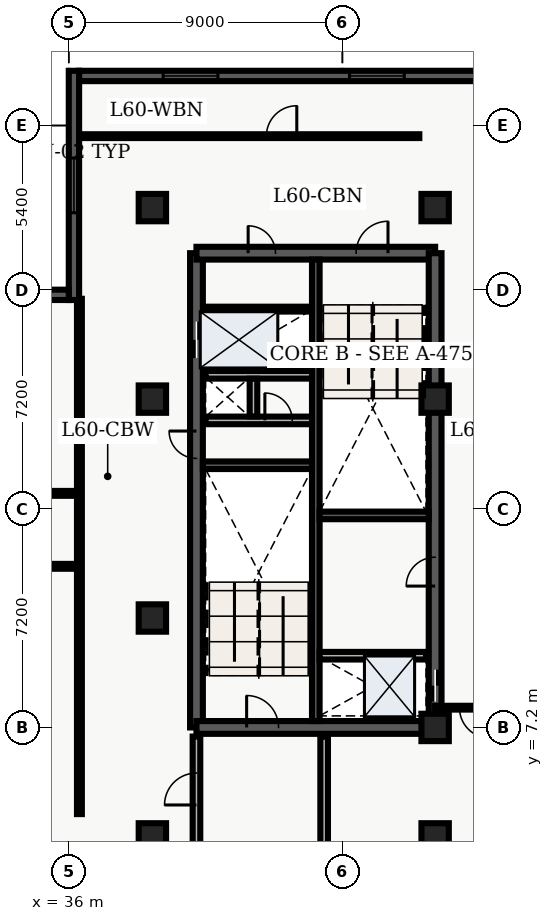
"""IFC4 building model, lengths in metres.
Left out: names, types, materials, properties, quantities, classifications, styles, units other than length and angle.
Written with IfcOpenShell. Run it as: python <this file> out.ifc"""

import sys

from ifc_helpers import new_model, entity, si_unit, converted_unit, direction, frame, origin_with_axes, origin_2d_with_axis, place, context, subcontext, project, spatial, polyline, rectangle, outline, extrude, element, fill, save


model = new_model("IFC4")
c1 = context("Model", 3, precision=1e-05, world=origin_with_axes(), true_north=direction((0.0, 1.0)))
c2 = subcontext(c1, "Body", "Model", "MODEL_VIEW")
j1 = project(units=[si_unit("LENGTHUNIT", "METRE"), converted_unit("PLANEANGLEUNIT", "DEGREE", entity("IfcPlaneAngleMeasure", 0.017), si_unit("PLANEANGLEUNIT", "RADIAN"), dimensions=[0, 0, 0, 0, 0, 0, 0])], contexts=[c1])
p1 = place(None, origin_with_axes())
s1 = spatial("IfcSite", under=j1, at=p1, CompositionType="ELEMENT")
p2 = place(p1, origin_with_axes())
s2 = spatial("IfcBuilding", under=s1, at=p2, CompositionType="ELEMENT")
p3 = place(p2, frame((0.0, 0.0, 244.2), z_axis=(0.0, 0.0, 1.0), x_axis=(1.0, 0.0, 0.0)))
s3 = spatial("IfcBuildingStorey", under=s2, at=p3, CompositionType="ELEMENT", Elevation=244.2)
p4 = place(p3, frame((40.2, 7.2, 0.0), z_axis=(0.0, 0.0, 1.0), x_axis=(0.0, 1.0, 0.0)))
e1 = element("IfcWall", 1, at=p4, inside=s3, PredefinedType="SHEAR", context=c2, shape_type="SweptSolid", body=[
    extrude(outline(polyline([(0.0, -0.21), (15.6, -0.21), (15.6, 0.21), (0.0, 0.21), (0.0, -0.21)])), origin_with_axes(), (0.0, 0.0, 1.0), 3.6),
])
p5 = place(p4, frame((12.75, 0.0, 0.0), z_axis=(0.0, 0.0, 1.0), x_axis=(1.0, 0.0, 0.0)))
e2 = element("IfcOpeningElement", 2, at=p5, cuts=e1, PredefinedType="OPENING", context=c2, shape_type="SweptSolid", body=[
    extrude(rectangle(XDim=1.2, YDim=0.44, at=origin_2d_with_axis()), origin_with_axes(), (0.0, 0.0, 1.0), 2.15),
])
p6 = place(p4, frame((9.3, 0.0, 0.0), z_axis=(0.0, 0.0, 1.0), x_axis=(1.0, 0.0, 0.0)))
e3 = element("IfcOpeningElement", 3, at=p6, cuts=e1, PredefinedType="OPENING", context=c2, shape_type="SweptSolid", body=[
    extrude(rectangle(XDim=0.9, YDim=0.44, at=origin_2d_with_axis()), origin_with_axes(), (0.0, 0.0, 1.0), 2.15),
])
p7 = place(p3, frame((40.2, 7.2, 0.0), z_axis=(0.0, 0.0, 1.0), x_axis=(1.0, 0.0, 0.0)))
e4 = element("IfcWall", 4, at=p7, inside=s3, PredefinedType="SHEAR", context=c2, shape_type="SweptSolid", body=[
    extrude(outline(polyline([(0.0, -0.21), (7.85, -0.21), (7.85, 0.21), (0.0, 0.21), (0.0, -0.21)])), origin_with_axes(), (0.0, 0.0, 1.0), 3.6),
])
p8 = place(p7, frame((2.175, 0.0, 0.0), z_axis=(0.0, 0.0, 1.0), x_axis=(1.0, 0.0, 0.0)))
e5 = element("IfcOpeningElement", 5, at=p8, cuts=e4, PredefinedType="OPENING", context=c2, shape_type="SweptSolid", body=[
    extrude(rectangle(XDim=1.05, YDim=0.44, at=origin_2d_with_axis()), origin_with_axes(), (0.0, 0.0, 1.0), 2.15),
])
p9 = place(p3, frame((40.2, 22.8, 0.0), z_axis=(0.0, 0.0, 1.0), x_axis=(1.0, 0.0, 0.0)))
e6 = element("IfcWall", 6, at=p9, inside=s3, PredefinedType="SHEAR", context=c2, shape_type="SweptSolid", body=[
    extrude(outline(polyline([(0.0, -0.21), (7.85, -0.21), (7.85, 0.21), (0.0, 0.21), (0.0, -0.21)])), origin_with_axes(), (0.0, 0.0, 1.0), 3.6),
])
p10 = place(p9, frame((5.775, 0.0, 0.0), z_axis=(0.0, 0.0, 1.0), x_axis=(1.0, 0.0, 0.0)))
e7 = element("IfcOpeningElement", 7, at=p10, cuts=e6, PredefinedType="OPENING", context=c2, shape_type="SweptSolid", body=[
    extrude(rectangle(XDim=1.05, YDim=0.44, at=origin_2d_with_axis()), origin_with_axes(), (0.0, 0.0, 1.0), 2.15),
])
p11 = place(p9, frame((2.15, 0.0, 0.0), z_axis=(0.0, 0.0, 1.0), x_axis=(1.0, 0.0, 0.0)))
e8 = element("IfcOpeningElement", 8, at=p11, cuts=e6, PredefinedType="OPENING", context=c2, shape_type="SweptSolid", body=[
    extrude(rectangle(XDim=0.9, YDim=0.44, at=origin_2d_with_axis()), origin_with_axes(), (0.0, 0.0, 1.0), 2.15),
])
p12 = place(p3, frame((48.05, 7.2, 0.0), z_axis=(0.0, 0.0, 1.0), x_axis=(0.0, 1.0, 0.0)))
e9 = element("IfcWall", 9, at=p12, inside=s3, PredefinedType="SHEAR", context=c2, shape_type="SweptSolid", body=[
    extrude(outline(polyline([(0.0, -0.21), (15.6, -0.21), (15.6, 0.21), (0.0, 0.21), (0.0, -0.21)])), origin_with_axes(), (0.0, 0.0, 1.0), 3.6),
])
p13 = place(p12, frame((1.375, 0.0, 0.0), z_axis=(0.0, 0.0, 1.0), x_axis=(1.0, 0.0, 0.0)))
e10 = element("IfcOpeningElement", 10, at=p13, cuts=e9, PredefinedType="OPENING", context=c2, shape_type="SweptSolid", body=[
    extrude(rectangle(XDim=1.05, YDim=0.44, at=origin_2d_with_axis()), origin_with_axes(), (0.0, 0.0, 1.0), 2.15),
])
p14 = place(p12, frame((5.125, 0.0, 0.0), z_axis=(0.0, 0.0, 1.0), x_axis=(1.0, 0.0, 0.0)))
e11 = element("IfcOpeningElement", 11, at=p14, cuts=e9, PredefinedType="OPENING", context=c2, shape_type="SweptSolid", body=[
    extrude(rectangle(XDim=0.95, YDim=0.44, at=origin_2d_with_axis()), origin_with_axes(), (0.0, 0.0, 1.0), 2.15),
])
p15 = place(p3, frame((44.125, 7.41, 0.0), z_axis=(0.0, 0.0, 1.0), x_axis=(0.0, 1.0, 0.0)))
e12 = element("IfcWall", 12, at=p15, inside=s3, PredefinedType="SHEAR", context=c2, shape_type="SweptSolid", body=[
    extrude(outline(polyline([(0.0, -0.125), (15.18, -0.125), (15.18, 0.125), (0.0, 0.125), (0.0, -0.125)])), origin_with_axes(), (0.0, 0.0, 1.0), 3.6),
])
for number, where, z_axis, x_axis in (
    (13, (40.41, 15.825, 0.0), (0.0, 0.0, 1.0), (1.0, 0.0, 0.0)),
    (14, (44.25, 14.175, 0.0), (0.0, 0.0, 1.0), (1.0, 0.0, 0.0)),
):
    element("IfcWall", number, at=place(p3, frame(where, z_axis=z_axis, x_axis=x_axis)), inside=s3, PredefinedType="SHEAR", context=c2, shape_type="SweptSolid", body=[
        extrude(outline(polyline([(0.0, -0.125), (3.59, -0.125), (3.59, 0.125), (0.0, 0.125), (0.0, -0.125)])), origin_with_axes(), (0.0, 0.0, 1.0), 3.6),
    ])
p16 = place(p3, frame((40.5, 17.3, 0.0), z_axis=(0.0, 0.0, 1.0), x_axis=(1.0, 0.0, 0.0)))
e15 = element("IfcWall", 15, at=p16, inside=s3, PredefinedType="SOLIDWALL", context=c2, shape_type="SweptSolid", body=[
    extrude(outline(polyline([(0.0, -0.125), (3.5, -0.125), (3.5, 0.125), (0.0, 0.125), (0.0, -0.125)])), origin_with_axes(), (0.0, 0.0, 1.0), 2.64),
])
p17 = place(p16, frame((2.4, 0.0, 0.0), z_axis=(0.0, 0.0, 1.0), x_axis=(1.0, 0.0, 0.0)))
e16 = element("IfcOpeningElement", 16, at=p17, cuts=e15, PredefinedType="OPENING", context=c2, shape_type="SweptSolid", body=[
    extrude(rectangle(XDim=0.9, YDim=0.27, at=origin_2d_with_axis()), origin_with_axes(), (0.0, 0.0, 1.0), 2.15),
])
p18 = place(p3, frame((40.5, 18.8, 0.0), z_axis=(0.0, 0.0, 1.0), x_axis=(1.0, 0.0, 0.0)))
e17 = element("IfcWall", 17, at=p18, inside=s3, PredefinedType="SOLIDWALL", context=c2, shape_type="SweptSolid", body=[
    extrude(outline(polyline([(0.0, -0.125), (3.5, -0.125), (3.5, 0.125), (0.0, 0.125), (0.0, -0.125)])), origin_with_axes(), (0.0, 0.0, 1.0), 2.64),
])
p19 = place(p3, frame((42.075, 17.43, 0.0), z_axis=(0.0, 0.0, 1.0), x_axis=(0.0, 1.0, 0.0)))
e18 = element("IfcWall", 18, at=p19, inside=s3, PredefinedType="SOLIDWALL", context=c2, shape_type="SweptSolid", body=[
    extrude(outline(polyline([(0.0, -0.125), (1.24, -0.125), (1.24, 0.125), (0.0, 0.125), (0.0, -0.125)])), origin_with_axes(), (0.0, 0.0, 1.0), 2.64),
])
p20 = place(p3, frame((40.2, 3.1, 0.0), z_axis=(0.0, 0.0, 1.0), x_axis=(0.0, 1.0, 0.0)))
e19 = element("IfcWall", 19, at=p20, inside=s3, PredefinedType="SOLIDWALL", context=c2, shape_type="SweptSolid", body=[
    extrude(outline(polyline([(0.0, -0.125), (3.8, -0.125), (3.8, 0.125), (0.0, 0.125), (0.0, -0.125)])), origin_with_axes(), (0.0, 0.0, 1.0), 2.64),
])
p21 = place(p20, frame((2.075, 0.0, 0.0), z_axis=(0.0, 0.0, 1.0), x_axis=(1.0, 0.0, 0.0)))
e20 = element("IfcOpeningElement", 20, at=p21, cuts=e19, PredefinedType="OPENING", context=c2, shape_type="SweptSolid", body=[
    extrude(rectangle(XDim=1.05, YDim=0.27, at=origin_2d_with_axis()), origin_with_axes(), (0.0, 0.0, 1.0), 2.15),
])
p22 = place(p3, frame((44.4, 3.1, 0.0), z_axis=(0.0, 0.0, 1.0), x_axis=(0.0, 1.0, 0.0)))
e21 = element("IfcWall", 21, at=p22, inside=s3, PredefinedType="SOLIDWALL", context=c2, shape_type="SweptSolid", body=[
    extrude(outline(polyline([(0.0, -0.125), (3.8, -0.125), (3.8, 0.125), (0.0, 0.125), (0.0, -0.125)])), origin_with_axes(), (0.0, 0.0, 1.0), 2.64),
])
for number, where, z_axis, x_axis in (
    (22, (38.75, 3.6, 0.0), (0.0, 0.0, 1.0), (1.0, 0.0, 0.0)),
    (23, (38.75, 10.8, 0.0), (0.0, 0.0, 1.0), (1.0, 0.0, 0.0)),
    (24, (38.75, 18.0, 0.0), (0.0, 0.0, 1.0), (1.0, 0.0, 0.0)),
    (25, (38.75, 24.3, 0.0), (0.0, 0.0, 1.0), (1.0, 0.0, 0.0)),
    (26, (48.05, 3.6, 0.0), (0.0, 0.0, 1.0), (1.0, 0.0, 0.0)),
    (27, (48.05, 7.2, 0.0), (0.0, 0.0, 1.0), (1.0, 0.0, 0.0)),
    (28, (48.05, 18.0, 0.0), (0.0, 0.0, 1.0), (1.0, 0.0, 0.0)),
    (29, (48.05, 24.3, 0.0), (0.0, 0.0, 1.0), (1.0, 0.0, 0.0)),
):
    element("IfcColumn", number, at=place(p3, frame(where, z_axis=z_axis, x_axis=x_axis)), inside=s3, PredefinedType="COLUMN", context=c2, shape_type="SweptSolid", body=[
        extrude(rectangle(XDim=0.9, YDim=0.9, at=origin_2d_with_axis()), origin_with_axes(), (0.0, 0.0, 1.0), 3.9),
    ])
p23 = place(p3, frame((40.5, 20.96, 0.0), z_axis=(0.0, 0.0, 1.0), x_axis=(1.0, 0.0, 0.0)))
e30 = element("IfcWall", 30, at=p23, inside=s3, PredefinedType="PARTITIONING", context=c2, shape_type="SweptSolid", body=[
    extrude(outline(polyline([(0.0, -0.08), (3.5, -0.08), (3.5, 0.08), (0.0, 0.08), (0.0, -0.08)])), origin_with_axes(), (0.0, 0.0, 1.0), 2.64),
])
p24 = place(p3, frame((44.25, 9.56, 0.0), z_axis=(0.0, 0.0, 1.0), x_axis=(1.0, 0.0, 0.0)))
e31 = element("IfcWall", 31, at=p24, inside=s3, PredefinedType="SOLIDWALL", context=c2, shape_type="SweptSolid", body=[
    extrude(outline(polyline([(0.0, -0.125), (3.5, -0.125), (3.5, 0.125), (0.0, 0.125), (0.0, -0.125)])), origin_with_axes(), (0.0, 0.0, 1.0), 2.64),
])
p25 = place(p3, frame((20.3, 12.5, 0.0), z_axis=(0.0, 0.0, 1.0), x_axis=(1.0, 0.0, 0.0)))
e32 = element("IfcWall", 32, at=p25, inside=s3, PredefinedType="PARTITIONING", context=c2, shape_type="SweptSolid", body=[
    extrude(outline(polyline([(0.0, -0.08), (16.05, -0.08), (16.05, 0.08), (0.0, 0.08), (0.0, -0.08)])), origin_with_axes(), (0.0, 0.0, 1.0), 2.64),
])
p26 = place(p25, frame((8.075, 0.0, 0.0), z_axis=(0.0, 0.0, 1.0), x_axis=(1.0, 0.0, 0.0)))
e33 = element("IfcOpeningElement", 33, at=p26, cuts=e32, PredefinedType="OPENING", context=c2, shape_type="SweptSolid", body=[
    extrude(rectangle(XDim=1.0, YDim=0.18, at=origin_2d_with_axis()), origin_with_axes(), (0.0, 0.0, 1.0), 2.15),
])
p27 = place(p3, frame((20.3, 14.9, 0.0), z_axis=(0.0, 0.0, 1.0), x_axis=(1.0, 0.0, 0.0)))
e34 = element("IfcWall", 34, at=p27, inside=s3, PredefinedType="PARTITIONING", context=c2, shape_type="SweptSolid", body=[
    extrude(outline(polyline([(0.0, -0.08), (16.05, -0.08), (16.05, 0.08), (0.0, 0.08), (0.0, -0.08)])), origin_with_axes(), (0.0, 0.0, 1.0), 2.64),
])
p28 = place(p27, frame((1.827, 0.0, 0.0), z_axis=(0.0, 0.0, 1.0), x_axis=(1.0, 0.0, 0.0)))
e35 = element("IfcOpeningElement", 35, at=p28, cuts=e34, PredefinedType="OPENING", context=c2, shape_type="SweptSolid", body=[
    extrude(rectangle(XDim=1.0, YDim=0.18, at=origin_2d_with_axis()), origin_with_axes(), (0.0, 0.0, 1.0), 2.15),
])
p29 = place(p27, frame((5.386, 0.0, 0.0), z_axis=(0.0, 0.0, 1.0), x_axis=(1.0, 0.0, 0.0)))
e36 = element("IfcOpeningElement", 36, at=p29, cuts=e34, PredefinedType="OPENING", context=c2, shape_type="SweptSolid", body=[
    extrude(rectangle(XDim=1.0, YDim=0.18, at=origin_2d_with_axis()), origin_with_axes(), (0.0, 0.0, 1.0), 2.15),
])
p30 = place(p27, frame((9.236, 0.0, 0.0), z_axis=(0.0, 0.0, 1.0), x_axis=(1.0, 0.0, 0.0)))
e37 = element("IfcOpeningElement", 37, at=p30, cuts=e34, PredefinedType="OPENING", context=c2, shape_type="SweptSolid", body=[
    extrude(rectangle(XDim=1.0, YDim=0.18, at=origin_2d_with_axis()), origin_with_axes(), (0.0, 0.0, 1.0), 2.15),
])
p31 = place(p27, frame((13.572, 0.0, 0.0), z_axis=(0.0, 0.0, 1.0), x_axis=(1.0, 0.0, 0.0)))
e38 = element("IfcOpeningElement", 38, at=p31, cuts=e34, PredefinedType="OPENING", context=c2, shape_type="SweptSolid", body=[
    extrude(rectangle(XDim=1.0, YDim=0.18, at=origin_2d_with_axis()), origin_with_axes(), (0.0, 0.0, 1.0), 2.15),
])
p32 = place(p3, frame((36.35, 4.35, 0.0), z_axis=(0.0, 0.0, 1.0), x_axis=(0.0, 1.0, 0.0)))
e39 = element("IfcWall", 39, at=p32, inside=s3, PredefinedType="PARTITIONING", context=c2, shape_type="SweptSolid", body=[
    extrude(outline(polyline([(0.0, -0.08), (16.95, -0.08), (16.95, 0.08), (0.0, 0.08), (0.0, -0.08)])), origin_with_axes(), (0.0, 0.0, 1.0), 2.64),
])
p33 = place(p3, frame((51.865, 7.85, 0.0), z_axis=(0.0, 0.0, 1.0), x_axis=(-1.0, 0.0, 0.0)))
e40 = element("IfcWall", 40, at=p33, inside=s3, PredefinedType="PARTITIONING", context=c2, shape_type="SweptSolid", body=[
    extrude(outline(polyline([(0.0, -0.062), (3.815, -0.062), (3.815, 0.062), (0.0, 0.062), (0.0, -0.062)])), origin_with_axes(), (0.0, 0.0, 1.0), 2.64),
])
p34 = place(p33, frame((2.515, 0.0, 0.0), z_axis=(0.0, 0.0, 1.0), x_axis=(1.0, 0.0, 0.0)))
e41 = element("IfcOpeningElement", 41, at=p34, cuts=e40, PredefinedType="OPENING", context=c2, shape_type="SweptSolid", body=[
    extrude(rectangle(XDim=1.0, YDim=0.145, at=origin_2d_with_axis()), origin_with_axes(), (0.0, 0.0, 1.0), 2.15),
])
p35 = place(p3, frame((36.335, 26.65, 0.0), z_axis=(0.0, 0.0, 1.0), x_axis=(1.0, 0.0, 0.0)))
e42 = element("IfcWall", 42, at=p35, inside=s3, PredefinedType="PARTITIONING", context=c2, shape_type="SweptSolid", body=[
    extrude(outline(polyline([(0.0, -0.062), (11.195, -0.062), (11.195, 0.062), (0.0, 0.062), (0.0, -0.062)])), origin_with_axes(), (0.0, 0.0, 1.0), 2.64),
])
p36 = place(p35, frame((6.665, 0.0, 0.0), z_axis=(0.0, 0.0, 1.0), x_axis=(1.0, 0.0, 0.0)))
e43 = element("IfcOpeningElement", 43, at=p36, cuts=e42, PredefinedType="OPENING", context=c2, shape_type="SweptSolid", body=[
    extrude(rectangle(XDim=1.0, YDim=0.145, at=origin_2d_with_axis()), origin_with_axes(), (0.0, 0.0, 1.0), 2.15),
])
p37 = place(p3, frame((36.17, 21.26, 0.0), z_axis=(0.0, 0.0, 1.0), x_axis=(0.0, 1.0, 0.0)))
e44 = element("IfcWall", 44, at=p37, inside=s3, PredefinedType="SOLIDWALL", context=c2, shape_type="SweptSolid", body=[
    extrude(outline(polyline([(0.0, -0.17), (7.54, -0.17), (7.54, 0.17), (0.0, 0.17), (0.0, -0.17)])), origin_with_axes(), (0.0, 0.0, 1.0), 3.6),
])
p38 = place(p37, frame((3.77, 0.0, 0.45), z_axis=(0.0, 0.0, 1.0), x_axis=(1.0, 0.0, 0.0)))
e45 = element("IfcOpeningElement", 45, at=p38, cuts=e44, PredefinedType="OPENING", context=c2, shape_type="SweptSolid", body=[
    extrude(rectangle(XDim=1.8, YDim=0.36, at=origin_2d_with_axis()), origin_with_axes(), (0.0, 0.0, 1.0), 2.1),
])
p39 = place(p3, frame((36.34, 28.63, 0.0), z_axis=(0.0, 0.0, 1.0), x_axis=(1.0, 0.0, 0.0)))
e46 = element("IfcWall", 46, at=p39, inside=s3, PredefinedType="SOLIDWALL", context=c2, shape_type="SweptSolid", body=[
    extrude(outline(polyline([(0.0, -0.17), (13.46, -0.17), (13.46, 0.17), (0.0, 0.17), (0.0, -0.17)])), origin_with_axes(), (0.0, 0.0, 1.0), 3.6),
])
p40 = place(p39, frame((3.665, 0.0, 0.45), z_axis=(0.0, 0.0, 1.0), x_axis=(1.0, 0.0, 0.0)))
e47 = element("IfcOpeningElement", 47, at=p40, cuts=e46, PredefinedType="OPENING", context=c2, shape_type="SweptSolid", body=[
    extrude(rectangle(XDim=1.8, YDim=0.36, at=origin_2d_with_axis()), origin_with_axes(), (0.0, 0.0, 1.0), 2.1),
])
p41 = place(p39, frame((9.795, 0.0, 0.45), z_axis=(0.0, 0.0, 1.0), x_axis=(1.0, 0.0, 0.0)))
e48 = element("IfcOpeningElement", 48, at=p41, cuts=e46, PredefinedType="OPENING", context=c2, shape_type="SweptSolid", body=[
    extrude(rectangle(XDim=1.8, YDim=0.36, at=origin_2d_with_axis()), origin_with_axes(), (0.0, 0.0, 1.0), 2.1),
])
p42 = place(p3, frame((32.06, 21.43, 0.0), z_axis=(0.0, 0.0, 1.0), x_axis=(1.0, 0.0, 0.0)))
e49 = element("IfcWall", 49, at=p42, inside=s3, PredefinedType="SOLIDWALL", context=c2, shape_type="SweptSolid", body=[
    extrude(outline(polyline([(0.0, -0.17), (3.94, -0.17), (3.94, 0.17), (0.0, 0.17), (0.0, -0.17)])), origin_with_axes(), (0.0, 0.0, 1.0), 3.6),
])
p43 = place(p12, frame((1.375, 0.0, 0.0), z_axis=(0.0, 0.0, 1.0), x_axis=(1.0, 0.0, 0.0)))
e50 = element("IfcDoor", 50, at=p43, inside=s3, OperationType="SLIDING_TO_LEFT", PredefinedType="DOOR", context=c2, shape_type="SweptSolid", body=[
    extrude(rectangle(XDim=1.05, YDim=0.09, at=origin_2d_with_axis()), origin_with_axes(), (0.0, 0.0, 1.0), 2.15),
])
fill(e10, e50)
p44 = place(p4, frame((12.75, 0.0, 0.0), z_axis=(0.0, 0.0, 1.0), x_axis=(1.0, 0.0, 0.0)))
e51 = element("IfcDoor", 51, at=p44, inside=s3, OperationType="DOUBLE_DOOR_SLIDING", PredefinedType="DOOR", context=c2, shape_type="SweptSolid", body=[
    extrude(rectangle(XDim=1.2, YDim=0.09, at=origin_2d_with_axis()), origin_with_axes(), (0.0, 0.0, 1.0), 2.15),
])
fill(e2, e51)
p45 = place(p4, frame((9.3, 0.0, 0.0), z_axis=(0.0, 0.0, 1.0), x_axis=(1.0, 0.0, 0.0)))
e52 = element("IfcDoor", 52, at=p45, inside=s3, OperationType="SINGLE_SWING_RIGHT", PredefinedType="DOOR", context=c2, shape_type="SweptSolid", body=[
    extrude(rectangle(XDim=0.9, YDim=0.09, at=origin_2d_with_axis()), origin_with_axes(), (0.0, 0.0, 1.0), 2.15),
])
fill(e3, e52)
p46 = place(p16, frame((2.4, 0.0, 0.0), z_axis=(0.0, 0.0, 1.0), x_axis=(1.0, 0.0, 0.0)))
e53 = element("IfcDoor", 53, at=p46, inside=s3, OperationType="SINGLE_SWING_LEFT", PredefinedType="DOOR", context=c2, shape_type="SweptSolid", body=[
    extrude(rectangle(XDim=0.9, YDim=0.09, at=origin_2d_with_axis()), origin_with_axes(), (0.0, 0.0, 1.0), 2.15),
])
fill(e16, e53)
p47 = place(p7, frame((2.175, 0.0, 0.0), z_axis=(0.0, 0.0, 1.0), x_axis=(1.0, 0.0, 0.0)))
e54 = element("IfcDoor", 54, at=p47, inside=s3, OperationType="SINGLE_SWING_LEFT", PredefinedType="DOOR", context=c2, shape_type="SweptSolid", body=[
    extrude(rectangle(XDim=1.05, YDim=0.09, at=origin_2d_with_axis()), origin_with_axes(), (0.0, 0.0, 1.0), 2.15),
])
fill(e5, e54)
p48 = place(p9, frame((5.775, 0.0, 0.0), z_axis=(0.0, 0.0, 1.0), x_axis=(1.0, 0.0, 0.0)))
e55 = element("IfcDoor", 55, at=p48, inside=s3, OperationType="SINGLE_SWING_RIGHT", PredefinedType="DOOR", context=c2, shape_type="SweptSolid", body=[
    extrude(rectangle(XDim=1.05, YDim=0.09, at=origin_2d_with_axis()), origin_with_axes(), (0.0, 0.0, 1.0), 2.15),
])
fill(e7, e55)
p49 = place(p20, frame((2.075, 0.0, 0.0), z_axis=(0.0, 0.0, 1.0), x_axis=(1.0, 0.0, 0.0)))
e56 = element("IfcDoor", 56, at=p49, inside=s3, OperationType="SINGLE_SWING_LEFT", PredefinedType="DOOR", context=c2, shape_type="SweptSolid", body=[
    extrude(rectangle(XDim=1.05, YDim=0.09, at=origin_2d_with_axis()), origin_with_axes(), (0.0, 0.0, 1.0), 2.15),
])
fill(e20, e56)
p50 = place(p9, frame((2.15, 0.0, 0.0), z_axis=(0.0, 0.0, 1.0), x_axis=(1.0, 0.0, 0.0)))
e57 = element("IfcDoor", 57, at=p50, inside=s3, OperationType="SINGLE_SWING_LEFT", PredefinedType="DOOR", context=c2, shape_type="SweptSolid", body=[
    extrude(rectangle(XDim=0.9, YDim=0.09, at=origin_2d_with_axis()), origin_with_axes(), (0.0, 0.0, 1.0), 2.15),
])
fill(e8, e57)
p51 = place(p12, frame((5.125, 0.0, 0.0), z_axis=(0.0, 0.0, 1.0), x_axis=(1.0, 0.0, 0.0)))
e58 = element("IfcDoor", 58, at=p51, inside=s3, OperationType="SINGLE_SWING_LEFT", PredefinedType="DOOR", context=c2, shape_type="SweptSolid", body=[
    extrude(rectangle(XDim=0.95, YDim=0.09, at=origin_2d_with_axis()), origin_with_axes(), (0.0, 0.0, 1.0), 2.15),
])
fill(e11, e58)
p52 = place(p33, frame((2.515, 0.0, 0.0), z_axis=(0.0, 0.0, 1.0), x_axis=(1.0, 0.0, 0.0)))
e59 = element("IfcDoor", 59, at=p52, inside=s3, OperationType="SINGLE_SWING_LEFT", PredefinedType="DOOR", context=c2, shape_type="SweptSolid", body=[
    extrude(rectangle(XDim=1.0, YDim=0.075, at=origin_2d_with_axis()), origin_with_axes(), (0.0, 0.0, 1.0), 2.15),
])
fill(e41, e59)
p53 = place(p35, frame((6.665, 0.0, 0.0), z_axis=(0.0, 0.0, 1.0), x_axis=(1.0, 0.0, 0.0)))
e60 = element("IfcDoor", 60, at=p53, inside=s3, OperationType="SINGLE_SWING_RIGHT", PredefinedType="DOOR", context=c2, shape_type="SweptSolid", body=[
    extrude(rectangle(XDim=1.0, YDim=0.075, at=origin_2d_with_axis()), origin_with_axes(), (0.0, 0.0, 1.0), 2.15),
])
fill(e43, e60)
p54 = place(p37, frame((3.77, 0.0, 0.45), z_axis=(0.0, 0.0, 1.0), x_axis=(1.0, 0.0, 0.0)))
e61 = element("IfcWindow", 61, at=p54, inside=s3, PredefinedType="WINDOW", context=c2, shape_type="SweptSolid", body=[
    extrude(rectangle(XDim=1.8, YDim=0.09, at=origin_2d_with_axis()), origin_with_axes(), (0.0, 0.0, 1.0), 2.1),
])
fill(e45, e61)
p55 = place(p39, frame((3.665, 0.0, 0.45), z_axis=(0.0, 0.0, 1.0), x_axis=(1.0, 0.0, 0.0)))
e62 = element("IfcWindow", 62, at=p55, inside=s3, PredefinedType="WINDOW", context=c2, shape_type="SweptSolid", body=[
    extrude(rectangle(XDim=1.8, YDim=0.09, at=origin_2d_with_axis()), origin_with_axes(), (0.0, 0.0, 1.0), 2.1),
])
fill(e47, e62)
p56 = place(p39, frame((9.795, 0.0, 0.45), z_axis=(0.0, 0.0, 1.0), x_axis=(1.0, 0.0, 0.0)))
e63 = element("IfcWindow", 63, at=p56, inside=s3, PredefinedType="WINDOW", context=c2, shape_type="SweptSolid", body=[
    extrude(rectangle(XDim=1.8, YDim=0.09, at=origin_2d_with_axis()), origin_with_axes(), (0.0, 0.0, 1.0), 2.1),
])
fill(e48, e63)
save(model, sys.argv[1])
